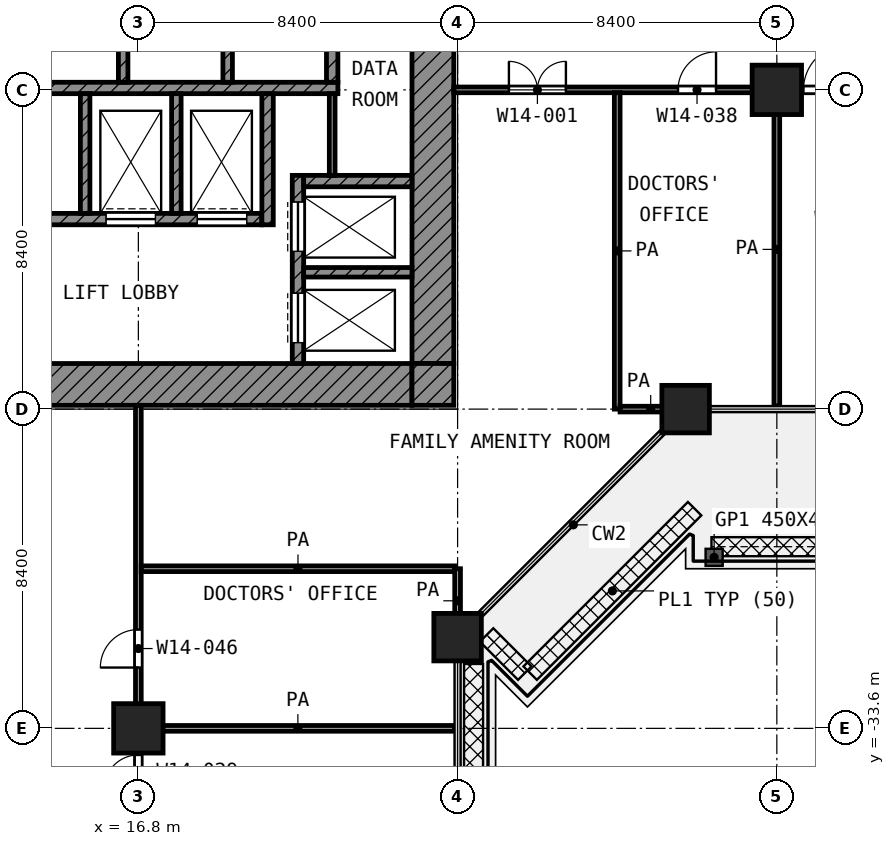
"""IFC4 building model, lengths in metres.
Left out: names, types, materials, properties, quantities, classifications, styles, units other than length and angle.
Written with IfcOpenShell. Run it as: python <this file> out.ifc"""

import sys

from ifc_helpers import new_model, si_unit, direction, frame, frame_2d, origin, origin_2d, place, context, subcontext, project, spatial, rectangle, extrude, element, fill, save


model = new_model("IFC4")
c1 = context("Model", 3, precision=1e-05, world=origin(), true_north=direction((0.0, 1.0)))
c2 = subcontext(c1, "Body", "Model", "MODEL_VIEW")
j1 = project(units=[si_unit("LENGTHUNIT", "METRE"), si_unit("PLANEANGLEUNIT", "RADIAN")], contexts=[c1])
p1 = place(None, origin())
s1 = spatial("IfcSite", under=j1, at=p1, CompositionType="ELEMENT")
p2 = place(p1, origin())
s2 = spatial("IfcBuilding", under=s1, at=p2, CompositionType="ELEMENT")
p3 = place(p2, frame((0.0, 0.0, 64.4)))
s3 = spatial("IfcBuildingStorey", under=s2, at=p3, CompositionType="ELEMENT", Elevation=64.4)
p4 = place(p3, frame((33.6, -16.8, 0.0), z_axis=(0.0, 0.0, 1.0), x_axis=(1.0, 0.0, 0.0)))
e1 = element("IfcColumn", 1, at=p4, inside=s3, PredefinedType="COLUMN", context=c2, shape_type="SweptSolid", body=[
    extrude(rectangle(XDim=1.3, YDim=1.3, at=origin_2d()), origin(), (0.0, 0.0, 1.0), 4.2),
])
for number, where, z_axis, x_axis in (
    (2, (31.2, -25.2, 0.0), (0.0, 0.0, 1.0), (1.0, 0.0, 0.0)),
    (3, (25.2, -31.2, 0.0), (0.0, 0.0, 1.0), (1.0, 0.0, 0.0)),
):
    element("IfcColumn", number, at=place(p3, frame(where, z_axis=z_axis, x_axis=x_axis)), inside=s3, PredefinedType="COLUMN", context=c2, shape_type="SweptSolid", body=[
        extrude(rectangle(XDim=1.25, YDim=1.25, at=origin_2d()), origin(), (0.0, 0.0, 1.0), 4.2),
    ])
p5 = place(p3, frame((16.8, -33.6, 0.0), z_axis=(0.0, 0.0, 1.0), x_axis=(1.0, 0.0, 0.0)))
e4 = element("IfcColumn", 4, at=p5, inside=s3, PredefinedType="COLUMN", context=c2, shape_type="SweptSolid", body=[
    extrude(rectangle(XDim=1.3, YDim=1.3, at=origin_2d()), origin(), (0.0, 0.0, 1.0), 4.2),
])
p6 = place(p3, frame((24.55, -24.0, 0.0), z_axis=(0.0, 0.0, 1.0), x_axis=(0.0, 1.0, 0.0)))
e5 = element("IfcWall", 5, at=p6, inside=s3, PredefinedType="SHEAR", context=c2, shape_type="SweptSolid", body=[
    extrude(rectangle(XDim=18.6, YDim=1.1, at=frame_2d((9.3, 0.0))), origin(), (0.0, 0.0, 1.0), 3.9),
])
p7 = place(p6, frame((10.5, 0.0, 0.0)))
e6 = element("IfcOpeningElement", 6, at=p7, cuts=e5, PredefinedType="OPENING", context=c2, shape_type="SweptSolid", body=[
    extrude(rectangle(XDim=1.8, YDim=2.1, at=frame_2d((0.9, 1.05))), frame((0.0, 0.56, 0.0), z_axis=(0.0, -1.0, 0.0), x_axis=(1.0, 0.0, 0.0)), (0.0, 0.0, 1.0), 1.12),
])
p8 = place(p3, frame((5.4, -24.55, 0.0), z_axis=(0.0, 0.0, 1.0), x_axis=(1.0, 0.0, 0.0)))
e7 = element("IfcWall", 7, at=p8, inside=s3, PredefinedType="SHEAR", context=c2, shape_type="SweptSolid", body=[
    extrude(rectangle(XDim=18.6, YDim=1.1, at=frame_2d((9.3, 0.0))), origin(), (0.0, 0.0, 1.0), 3.9),
])
p9 = place(p8, frame((6.3, 0.0, 0.0)))
e8 = element("IfcOpeningElement", 8, at=p9, cuts=e7, PredefinedType="OPENING", context=c2, shape_type="SweptSolid", body=[
    extrude(rectangle(XDim=1.8, YDim=2.1, at=frame_2d((0.9, 1.05))), frame((0.0, 0.56, 0.0), z_axis=(0.0, -1.0, 0.0), x_axis=(1.0, 0.0, 0.0)), (0.0, 0.0, 1.0), 1.12),
])
p10 = place(p3, frame((24.55, -25.1, 0.0), z_axis=(0.0, 0.0, 1.0), x_axis=(0.0, 1.0, 0.0)))
e9 = element("IfcWall", 9, at=p10, inside=s3, PredefinedType="SHEAR", context=c2, shape_type="SweptSolid", body=[
    extrude(rectangle(XDim=1.1, YDim=1.1, at=frame_2d((0.55, 0.0))), origin(), (0.0, 0.0, 1.0), 3.9),
])
p11 = place(p3, frame((5.4, -16.75, 0.0), z_axis=(0.0, 0.0, 1.0), x_axis=(1.0, 0.0, 0.0)))
e10 = element("IfcWall", 10, at=p11, inside=s3, PredefinedType="SHEAR", context=c2, shape_type="SweptSolid", body=[
    extrude(rectangle(XDim=16.65, YDim=0.3, at=frame_2d((8.325, 0.0))), origin(), (0.0, 0.0, 1.0), 3.9),
])
p12 = place(p3, frame((5.4, -20.2, 0.0), z_axis=(0.0, 0.0, 1.0), x_axis=(1.0, 0.0, 0.0)))
e11 = element("IfcWall", 11, at=p12, inside=s3, PredefinedType="SHEAR", context=c2, shape_type="SweptSolid", body=[
    extrude(rectangle(XDim=14.65, YDim=0.3, at=frame_2d((7.325, 0.0))), origin(), (0.0, 0.0, 1.0), 3.9),
])
p13 = place(p12, frame((10.55, 0.0, 0.0)))
e12 = element("IfcOpeningElement", 12, at=p13, cuts=e11, PredefinedType="OPENING", context=c2, shape_type="SweptSolid", body=[
    extrude(rectangle(XDim=1.3, YDim=2.1, at=frame_2d((0.65, 1.05))), frame((0.0, 0.16, 0.0), z_axis=(0.0, -1.0, 0.0), x_axis=(1.0, 0.0, 0.0)), (0.0, 0.0, 1.0), 0.32),
])
p14 = place(p12, frame((12.95, 0.0, 0.0)))
e13 = element("IfcOpeningElement", 13, at=p14, cuts=e11, PredefinedType="OPENING", context=c2, shape_type="SweptSolid", body=[
    extrude(rectangle(XDim=1.3, YDim=2.1, at=frame_2d((0.65, 1.05))), frame((0.0, 0.16, 0.0), z_axis=(0.0, -1.0, 0.0), x_axis=(1.0, 0.0, 0.0)), (0.0, 0.0, 1.0), 0.32),
])
p15 = place(p12, frame((0.55, 0.0, 0.0)))
e14 = element("IfcOpeningElement", 14, at=p15, cuts=e11, PredefinedType="OPENING", context=c2, shape_type="SweptSolid", body=[
    extrude(rectangle(XDim=1.3, YDim=2.1, at=frame_2d((0.65, 1.05))), frame((0.0, 0.16, 0.0), z_axis=(0.0, -1.0, 0.0), x_axis=(1.0, 0.0, 0.0)), (0.0, 0.0, 1.0), 0.32),
])
p16 = place(p12, frame((2.95, 0.0, 0.0)))
e15 = element("IfcOpeningElement", 15, at=p16, cuts=e11, PredefinedType="OPENING", context=c2, shape_type="SweptSolid", body=[
    extrude(rectangle(XDim=1.3, YDim=2.1, at=frame_2d((0.65, 1.05))), frame((0.0, 0.16, 0.0), z_axis=(0.0, -1.0, 0.0), x_axis=(1.0, 0.0, 0.0)), (0.0, 0.0, 1.0), 0.32),
])
p17 = place(p12, frame((5.35, 0.0, 0.0)))
e16 = element("IfcOpeningElement", 16, at=p17, cuts=e11, PredefinedType="OPENING", context=c2, shape_type="SweptSolid", body=[
    extrude(rectangle(XDim=0.9, YDim=2.1, at=frame_2d((0.45, 1.05))), frame((0.0, 0.16, 0.0), z_axis=(0.0, -1.0, 0.0), x_axis=(1.0, 0.0, 0.0)), (0.0, 0.0, 1.0), 0.32),
])
p18 = place(p12, frame((7.75, 0.0, 0.0)))
e17 = element("IfcOpeningElement", 17, at=p18, cuts=e11, PredefinedType="OPENING", context=c2, shape_type="SweptSolid", body=[
    extrude(rectangle(XDim=0.9, YDim=2.1, at=frame_2d((0.45, 1.05))), frame((0.0, 0.16, 0.0), z_axis=(0.0, -1.0, 0.0), x_axis=(1.0, 0.0, 0.0)), (0.0, 0.0, 1.0), 0.32),
])
p19 = place(p3, frame((20.2, -20.35, 0.0), z_axis=(0.0, 0.0, 1.0), x_axis=(0.0, 1.0, 0.0)))
e18 = element("IfcWall", 18, at=p19, inside=s3, PredefinedType="SHEAR", context=c2, shape_type="SweptSolid", body=[
    extrude(rectangle(XDim=3.45, YDim=0.3, at=frame_2d((1.725, 0.0))), origin(), (0.0, 0.0, 1.0), 3.9),
])
p20 = place(p3, frame((21.9, -16.6, 0.0), z_axis=(0.0, 0.0, 1.0), x_axis=(0.0, 1.0, 0.0)))
e19 = element("IfcWall", 19, at=p20, inside=s3, PredefinedType="SHEAR", context=c2, shape_type="SweptSolid", body=[
    extrude(rectangle(XDim=2.35, YDim=0.3, at=frame_2d((1.175, 0.0))), origin(), (0.0, 0.0, 1.0), 3.9),
])
p21 = place(p3, frame((21.15, -19.2, 0.0), z_axis=(0.0, 0.0, 1.0), x_axis=(1.0, 0.0, 0.0)))
e20 = element("IfcWall", 20, at=p21, inside=s3, PredefinedType="SHEAR", context=c2, shape_type="SweptSolid", body=[
    extrude(rectangle(XDim=2.85, YDim=0.3, at=frame_2d((1.425, 0.0))), origin(), (0.0, 0.0, 1.0), 3.9),
])
p22 = place(p3, frame((21.0, -24.0, 0.0), z_axis=(0.0, 0.0, 1.0), x_axis=(0.0, 1.0, 0.0)))
e21 = element("IfcWall", 21, at=p22, inside=s3, PredefinedType="SHEAR", context=c2, shape_type="SweptSolid", body=[
    extrude(rectangle(XDim=4.95, YDim=0.3, at=frame_2d((2.475, 0.0))), origin(), (0.0, 0.0, 1.0), 3.9),
])
p23 = place(p22, frame((2.95, 0.0, 0.0)))
e22 = element("IfcOpeningElement", 22, at=p23, cuts=e21, PredefinedType="OPENING", context=c2, shape_type="SweptSolid", body=[
    extrude(rectangle(XDim=1.3, YDim=2.1, at=frame_2d((0.65, 1.05))), frame((0.0, 0.16, 0.0), z_axis=(0.0, -1.0, 0.0), x_axis=(1.0, 0.0, 0.0)), (0.0, 0.0, 1.0), 0.32),
])
p24 = place(p22, frame((0.55, 0.0, 0.0)))
e23 = element("IfcOpeningElement", 23, at=p24, cuts=e21, PredefinedType="OPENING", context=c2, shape_type="SweptSolid", body=[
    extrude(rectangle(XDim=1.3, YDim=2.1, at=frame_2d((0.65, 1.05))), frame((0.0, 0.16, 0.0), z_axis=(0.0, -1.0, 0.0), x_axis=(1.0, 0.0, 0.0)), (0.0, 0.0, 1.0), 0.32),
])
p25 = place(p3, frame((21.15, -21.6, 0.0), z_axis=(0.0, 0.0, 1.0), x_axis=(1.0, 0.0, 0.0)))
e24 = element("IfcWall", 24, at=p25, inside=s3, PredefinedType="SHEAR", context=c2, shape_type="SweptSolid", body=[
    extrude(rectangle(XDim=2.85, YDim=0.25, at=frame_2d((1.425, 0.0))), origin(), (0.0, 0.0, 1.0), 3.9),
])
for number, where, z_axis, x_axis in (
    (25, (15.4, -20.05, 0.0), (0.0, 0.0, 1.0), (0.0, 1.0, 0.0)),
    (26, (17.8, -20.05, 0.0), (0.0, 0.0, 1.0), (0.0, 1.0, 0.0)),
):
    element("IfcWall", number, at=place(p3, frame(where, z_axis=z_axis, x_axis=x_axis)), inside=s3, PredefinedType="SHEAR", context=c2, shape_type="SweptSolid", body=[
        extrude(rectangle(XDim=3.15, YDim=0.25, at=frame_2d((1.575, 0.0))), origin(), (0.0, 0.0, 1.0), 3.9),
    ])
for number, where, z_axis, x_axis in (
    (27, (16.4, -16.6, 0.0), (0.0, 0.0, 1.0), (0.0, 1.0, 0.0)),
    (28, (19.15, -16.6, 0.0), (0.0, 0.0, 1.0), (0.0, 1.0, 0.0)),
):
    element("IfcWall", number, at=place(p3, frame(where, z_axis=z_axis, x_axis=x_axis)), inside=s3, PredefinedType="SHEAR", context=c2, shape_type="SweptSolid", body=[
        extrude(rectangle(XDim=2.35, YDim=0.25, at=frame_2d((1.175, 0.0))), origin(), (0.0, 0.0, 1.0), 3.9),
    ])
p26 = place(p3, frame((21.9, -19.05, 0.0), z_axis=(0.0, 0.0, 1.0), x_axis=(0.0, 1.0, 0.0)))
e29 = element("IfcWall", 29, at=p26, inside=s3, PredefinedType="PARTITIONING", context=c2, shape_type="SweptSolid", body=[
    extrude(rectangle(XDim=2.15, YDim=0.15, at=frame_2d((1.075, 0.0))), origin(), (0.0, 0.0, 1.0), 3.9),
])
p27 = place(p3, frame((16.875, -33.6, 0.0), z_axis=(0.0, 0.0, 1.0), x_axis=(1.0, 0.0, 0.0)))
e30 = element("IfcWall", 30, at=p27, inside=s3, PredefinedType="PARTITIONING", context=c2, shape_type="SweptSolid", body=[
    extrude(rectangle(XDim=8.245, YDim=0.15, at=frame_2d((4.123, 0.0))), origin(), (0.0, 0.0, 1.0), 3.9),
])
p28 = place(p3, frame((16.875, -29.4, 0.0), z_axis=(0.0, 0.0, 1.0), x_axis=(1.0, 0.0, 0.0)))
e31 = element("IfcWall", 31, at=p28, inside=s3, PredefinedType="PARTITIONING", context=c2, shape_type="SweptSolid", body=[
    extrude(rectangle(XDim=8.25, YDim=0.15, at=frame_2d((4.125, 0.0))), origin(), (0.0, 0.0, 1.0), 3.9),
])
p29 = place(p3, frame((29.475, -25.2, 0.0), z_axis=(0.0, 0.0, 1.0), x_axis=(1.0, 0.0, 0.0)))
e32 = element("IfcWall", 32, at=p29, inside=s3, PredefinedType="PARTITIONING", context=c2, shape_type="SweptSolid", body=[
    extrude(rectangle(XDim=1.612, YDim=0.15, at=frame_2d((0.806, 0.0))), origin(), (0.0, 0.0, 1.0), 3.9),
])
p30 = place(p3, frame((25.1, -16.8, 0.0), z_axis=(0.0, 0.0, 1.0), x_axis=(1.0, 0.0, 0.0)))
e33 = element("IfcWall", 33, at=p30, inside=s3, PredefinedType="PARTITIONING", context=c2, shape_type="SweptSolid", body=[
    extrude(rectangle(XDim=24.65, YDim=0.15, at=frame_2d((12.325, 0.0))), origin(), (0.0, 0.0, 1.0), 3.9),
])
p31 = place(p30, frame((1.45, 0.0, 0.0)))
e34 = element("IfcOpeningElement", 34, at=p31, cuts=e33, PredefinedType="OPENING", context=c2, shape_type="SweptSolid", body=[
    extrude(rectangle(XDim=1.5, YDim=2.1, at=frame_2d((0.75, 1.05))), frame((0.0, 0.085, 0.0), z_axis=(0.0, -1.0, 0.0), x_axis=(1.0, 0.0, 0.0)), (0.0, 0.0, 1.0), 0.17),
])
p32 = place(p30, frame((5.9, 0.0, 0.0)))
e35 = element("IfcOpeningElement", 35, at=p32, cuts=e33, PredefinedType="OPENING", context=c2, shape_type="SweptSolid", body=[
    extrude(rectangle(XDim=1.0, YDim=2.1, at=frame_2d((0.5, 1.05))), frame((0.0, 0.085, 0.0), z_axis=(0.0, -1.0, 0.0), x_axis=(1.0, 0.0, 0.0)), (0.0, 0.0, 1.0), 0.17),
])
p33 = place(p30, frame((9.2, 0.0, 0.0)))
e36 = element("IfcOpeningElement", 36, at=p33, cuts=e33, PredefinedType="OPENING", context=c2, shape_type="SweptSolid", body=[
    extrude(rectangle(XDim=1.2, YDim=2.1, at=frame_2d((0.6, 1.05))), frame((0.0, 0.085, 0.0), z_axis=(0.0, -1.0, 0.0), x_axis=(1.0, 0.0, 0.0)), (0.0, 0.0, 1.0), 0.17),
])
p34 = place(p30, frame((15.0, 0.0, 0.0)))
e37 = element("IfcOpeningElement", 37, at=p34, cuts=e33, PredefinedType="OPENING", context=c2, shape_type="SweptSolid", body=[
    extrude(rectangle(XDim=1.2, YDim=2.1, at=frame_2d((0.6, 1.05))), frame((0.0, 0.085, 0.0), z_axis=(0.0, -1.0, 0.0), x_axis=(1.0, 0.0, 0.0)), (0.0, 0.0, 1.0), 0.17),
])
p35 = place(p30, frame((22.967, 0.0, 0.0)))
e38 = element("IfcOpeningElement", 38, at=p35, cuts=e33, PredefinedType="OPENING", context=c2, shape_type="SweptSolid", body=[
    extrude(rectangle(XDim=1.2, YDim=2.1, at=frame_2d((0.6, 1.05))), frame((0.0, 0.085, 0.0), z_axis=(0.0, -1.0, 0.0), x_axis=(1.0, 0.0, 0.0)), (0.0, 0.0, 1.0), 0.17),
])
p36 = place(p30, frame((17.6, 0.0, 0.0)))
e39 = element("IfcOpeningElement", 39, at=p36, cuts=e33, PredefinedType="OPENING", context=c2, shape_type="SweptSolid", body=[
    extrude(rectangle(XDim=1.2, YDim=2.1, at=frame_2d((0.6, 1.05))), frame((0.0, 0.085, 0.0), z_axis=(0.0, -1.0, 0.0), x_axis=(1.0, 0.0, 0.0)), (0.0, 0.0, 1.0), 0.17),
])
p37 = place(p3, frame((16.8, -71.32, 0.0), z_axis=(0.0, 0.0, 1.0), x_axis=(0.0, 1.0, 0.0)))
e40 = element("IfcWall", 40, at=p37, inside=s3, PredefinedType="PARTITIONING", context=c2, shape_type="SweptSolid", body=[
    extrude(rectangle(XDim=46.22, YDim=0.15, at=frame_2d((23.11, 0.0))), origin(), (0.0, 0.0, 1.0), 3.9),
])
p38 = place(p37, frame((39.32, 0.0, 0.0)))
e41 = element("IfcOpeningElement", 41, at=p38, cuts=e40, PredefinedType="OPENING", context=c2, shape_type="SweptSolid", body=[
    extrude(rectangle(XDim=1.0, YDim=2.1, at=frame_2d((0.5, 1.05))), frame((0.0, 0.085, 0.0), z_axis=(0.0, -1.0, 0.0), x_axis=(1.0, 0.0, 0.0)), (0.0, 0.0, 1.0), 0.17),
])
p39 = place(p37, frame((36.12, 0.0, 0.0)))
e42 = element("IfcOpeningElement", 42, at=p39, cuts=e40, PredefinedType="OPENING", context=c2, shape_type="SweptSolid", body=[
    extrude(rectangle(XDim=0.9, YDim=2.1, at=frame_2d((0.45, 1.05))), frame((0.0, 0.085, 0.0), z_axis=(0.0, -1.0, 0.0), x_axis=(1.0, 0.0, 0.0)), (0.0, 0.0, 1.0), 0.17),
])
p40 = place(p37, frame((30.32, 0.0, 0.0)))
e43 = element("IfcOpeningElement", 43, at=p40, cuts=e40, PredefinedType="OPENING", context=c2, shape_type="SweptSolid", body=[
    extrude(rectangle(XDim=1.2, YDim=2.1, at=frame_2d((0.6, 1.05))), frame((0.0, 0.085, 0.0), z_axis=(0.0, -1.0, 0.0), x_axis=(1.0, 0.0, 0.0)), (0.0, 0.0, 1.0), 0.17),
])
p41 = place(p37, frame((27.42, 0.0, 0.0)))
e44 = element("IfcOpeningElement", 44, at=p41, cuts=e40, PredefinedType="OPENING", context=c2, shape_type="SweptSolid", body=[
    extrude(rectangle(XDim=1.2, YDim=2.1, at=frame_2d((0.6, 1.05))), frame((0.0, 0.085, 0.0), z_axis=(0.0, -1.0, 0.0), x_axis=(1.0, 0.0, 0.0)), (0.0, 0.0, 1.0), 0.17),
])
p42 = place(p37, frame((19.02, 0.0, 0.0)))
e45 = element("IfcOpeningElement", 45, at=p42, cuts=e40, PredefinedType="OPENING", context=c2, shape_type="SweptSolid", body=[
    extrude(rectangle(XDim=1.2, YDim=2.1, at=frame_2d((0.6, 1.05))), frame((0.0, 0.085, 0.0), z_axis=(0.0, -1.0, 0.0), x_axis=(1.0, 0.0, 0.0)), (0.0, 0.0, 1.0), 0.17),
])
p43 = place(p37, frame((17.57, 0.0, 0.0)))
e46 = element("IfcOpeningElement", 46, at=p43, cuts=e40, PredefinedType="OPENING", context=c2, shape_type="SweptSolid", body=[
    extrude(rectangle(XDim=1.1, YDim=2.1, at=frame_2d((0.55, 1.05))), frame((0.0, 0.085, 0.0), z_axis=(0.0, -1.0, 0.0), x_axis=(1.0, 0.0, 0.0)), (0.0, 0.0, 1.0), 0.17),
])
p44 = place(p37, frame((13.72, 0.0, 0.0)))
e47 = element("IfcOpeningElement", 47, at=p44, cuts=e40, PredefinedType="OPENING", context=c2, shape_type="SweptSolid", body=[
    extrude(rectangle(XDim=1.2, YDim=2.1, at=frame_2d((0.6, 1.05))), frame((0.0, 0.085, 0.0), z_axis=(0.0, -1.0, 0.0), x_axis=(1.0, 0.0, 0.0)), (0.0, 0.0, 1.0), 0.17),
])
p45 = place(p37, frame((10.62, 0.0, 0.0)))
e48 = element("IfcOpeningElement", 48, at=p45, cuts=e40, PredefinedType="OPENING", context=c2, shape_type="SweptSolid", body=[
    extrude(rectangle(XDim=1.2, YDim=2.1, at=frame_2d((0.6, 1.05))), frame((0.0, 0.085, 0.0), z_axis=(0.0, -1.0, 0.0), x_axis=(1.0, 0.0, 0.0)), (0.0, 0.0, 1.0), 0.17),
])
p46 = place(p37, frame((4.87, 0.0, 0.0)))
e49 = element("IfcOpeningElement", 49, at=p46, cuts=e40, PredefinedType="OPENING", context=c2, shape_type="SweptSolid", body=[
    extrude(rectangle(XDim=1.5, YDim=2.1, at=frame_2d((0.75, 1.05))), frame((0.0, 0.085, 0.0), z_axis=(0.0, -1.0, 0.0), x_axis=(1.0, 0.0, 0.0)), (0.0, 0.0, 1.0), 0.17),
])
p47 = place(p3, frame((25.2, -31.087, 0.0), z_axis=(0.0, 0.0, 1.0), x_axis=(0.0, 1.0, 0.0)))
e50 = element("IfcWall", 50, at=p47, inside=s3, PredefinedType="PARTITIONING", context=c2, shape_type="SweptSolid", body=[
    extrude(rectangle(XDim=1.687, YDim=0.15, at=frame_2d((0.844, 0.0))), origin(), (0.0, 0.0, 1.0), 3.9),
])
p48 = place(p3, frame((29.4, -25.2, 0.0), z_axis=(0.0, 0.0, 1.0), x_axis=(0.0, 1.0, 0.0)))
e51 = element("IfcWall", 51, at=p48, inside=s3, PredefinedType="PARTITIONING", context=c2, shape_type="SweptSolid", body=[
    extrude(rectangle(XDim=8.325, YDim=0.15, at=frame_2d((4.163, 0.0))), origin(), (0.0, 0.0, 1.0), 3.9),
])
p49 = place(p3, frame((33.6, -25.12, 0.0), z_axis=(0.0, 0.0, 1.0), x_axis=(0.0, 1.0, 0.0)))
e52 = element("IfcWall", 52, at=p49, inside=s3, PredefinedType="PARTITIONING", context=c2, shape_type="SweptSolid", body=[
    extrude(rectangle(XDim=8.245, YDim=0.15, at=frame_2d((4.123, 0.0))), origin(), (0.0, 0.0, 1.0), 3.9),
])
p50 = place(p23, origin())
e53 = element("IfcDoor", 53, at=p50, inside=s3, OperationType="DOUBLE_DOOR_SLIDING", PredefinedType="DOOR", context=c2, shape_type="SweptSolid", body=[
    extrude(rectangle(XDim=1.3, YDim=2.1, at=frame_2d((0.65, 1.05))), frame((0.0, 0.025, 0.0), z_axis=(0.0, -1.0, 0.0), x_axis=(1.0, 0.0, 0.0)), (0.0, 0.0, 1.0), 0.05),
])
fill(e22, e53)
p51 = place(p24, origin())
e54 = element("IfcDoor", 54, at=p51, inside=s3, OperationType="DOUBLE_DOOR_SLIDING", PredefinedType="DOOR", context=c2, shape_type="SweptSolid", body=[
    extrude(rectangle(XDim=1.3, YDim=2.1, at=frame_2d((0.65, 1.05))), frame((0.0, 0.025, 0.0), z_axis=(0.0, -1.0, 0.0), x_axis=(1.0, 0.0, 0.0)), (0.0, 0.0, 1.0), 0.05),
])
fill(e23, e54)
p52 = place(p13, origin())
e55 = element("IfcDoor", 55, at=p52, inside=s3, OperationType="DOUBLE_DOOR_SLIDING", PredefinedType="DOOR", context=c2, shape_type="SweptSolid", body=[
    extrude(rectangle(XDim=1.3, YDim=2.1, at=frame_2d((0.65, 1.05))), frame((0.0, 0.025, 0.0), z_axis=(0.0, -1.0, 0.0), x_axis=(1.0, 0.0, 0.0)), (0.0, 0.0, 1.0), 0.05),
])
fill(e12, e55)
p53 = place(p14, origin())
e56 = element("IfcDoor", 56, at=p53, inside=s3, OperationType="DOUBLE_DOOR_SLIDING", PredefinedType="DOOR", context=c2, shape_type="SweptSolid", body=[
    extrude(rectangle(XDim=1.3, YDim=2.1, at=frame_2d((0.65, 1.05))), frame((0.0, 0.025, 0.0), z_axis=(0.0, -1.0, 0.0), x_axis=(1.0, 0.0, 0.0)), (0.0, 0.0, 1.0), 0.05),
])
fill(e13, e56)
p54 = place(p31, origin())
e57 = element("IfcDoor", 57, at=p54, inside=s3, OperationType="DOUBLE_DOOR_SINGLE_SWING", PredefinedType="DOOR", context=c2, shape_type="SweptSolid", body=[
    extrude(rectangle(XDim=1.5, YDim=2.1, at=frame_2d((0.75, 1.05))), frame((0.0, 0.025, 0.0), z_axis=(0.0, -1.0, 0.0), x_axis=(1.0, 0.0, 0.0)), (0.0, 0.0, 1.0), 0.05),
])
fill(e34, e57)
p55 = place(p32, origin())
e58 = element("IfcDoor", 58, at=p55, inside=s3, OperationType="SINGLE_SWING_RIGHT", PredefinedType="DOOR", context=c2, shape_type="SweptSolid", body=[
    extrude(rectangle(XDim=1.0, YDim=2.1, at=frame_2d((0.5, 1.05))), frame((0.0, 0.025, 0.0), z_axis=(0.0, -1.0, 0.0), x_axis=(1.0, 0.0, 0.0)), (0.0, 0.0, 1.0), 0.05),
])
fill(e35, e58)
p56 = place(p33, origin())
e59 = element("IfcDoor", 59, at=p56, inside=s3, OperationType="SINGLE_SWING_RIGHT", PredefinedType="DOOR", context=c2, shape_type="SweptSolid", body=[
    extrude(rectangle(XDim=1.2, YDim=2.1, at=frame_2d((0.6, 1.05))), frame((0.0, 0.025, 0.0), z_axis=(0.0, -1.0, 0.0), x_axis=(1.0, 0.0, 0.0)), (0.0, 0.0, 1.0), 0.05),
])
fill(e36, e59)
p57 = place(p38, origin())
e60 = element("IfcDoor", 60, at=p57, inside=s3, OperationType="SINGLE_SWING_LEFT", PredefinedType="DOOR", context=c2, shape_type="SweptSolid", body=[
    extrude(rectangle(XDim=1.0, YDim=2.1, at=frame_2d((0.5, 1.05))), frame((0.0, 0.025, 0.0), z_axis=(0.0, -1.0, 0.0), x_axis=(1.0, 0.0, 0.0)), (0.0, 0.0, 1.0), 0.05),
])
fill(e41, e60)
p58 = place(p39, origin())
e61 = element("IfcDoor", 61, at=p58, inside=s3, OperationType="SINGLE_SWING_LEFT", PredefinedType="DOOR", context=c2, shape_type="SweptSolid", body=[
    extrude(rectangle(XDim=0.9, YDim=2.1, at=frame_2d((0.45, 1.05))), frame((0.0, 0.025, 0.0), z_axis=(0.0, -1.0, 0.0), x_axis=(1.0, 0.0, 0.0)), (0.0, 0.0, 1.0), 0.05),
])
fill(e42, e61)
save(model, sys.argv[1])
